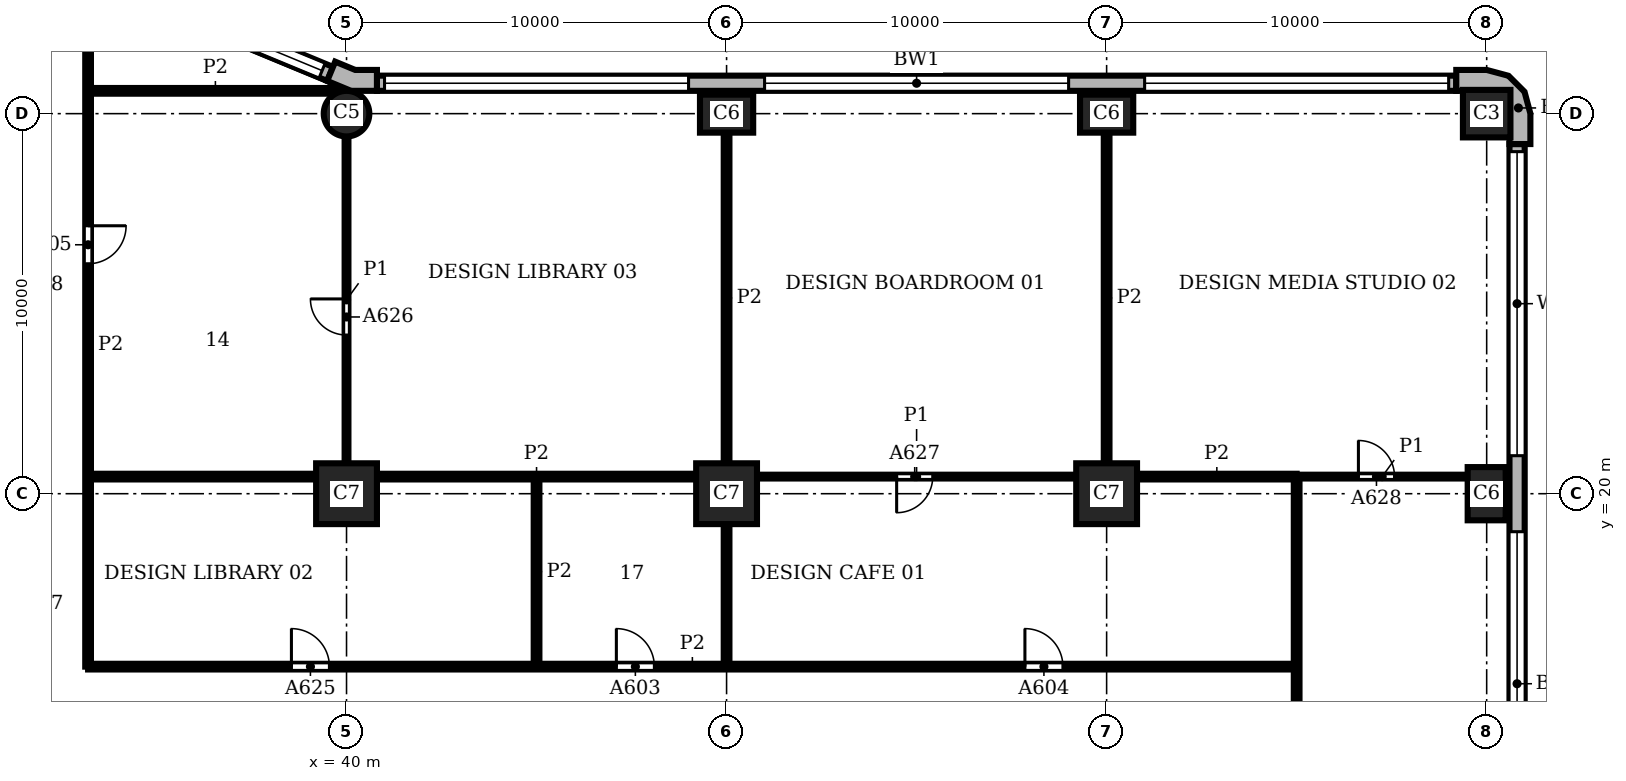
"""IFC4 building model, lengths in metres.
Left out: names, types, materials, properties, quantities, classifications, styles, units other than length and angle.
Written with IfcOpenShell. Run it as: python <this file> out.ifc"""

import sys

from ifc_helpers import new_model, si_unit, direction, frame, frame_2d, origin, origin_2d, place, context, subcontext, project, spatial, polyline, rectangle, circle, outline, extrude, element, fill, save


model = new_model("IFC4")
c1 = context("Model", 3, precision=1e-05, world=origin(), true_north=direction((0.0, 1.0)))
c2 = subcontext(c1, "Body", "Model", "MODEL_VIEW")
j1 = project(units=[si_unit("LENGTHUNIT", "METRE"), si_unit("PLANEANGLEUNIT", "RADIAN")], contexts=[c1])
p1 = place(None, origin())
s1 = spatial("IfcSite", under=j1, at=p1, CompositionType="ELEMENT")
p2 = place(p1, origin())
s2 = spatial("IfcBuilding", under=s1, at=p2, CompositionType="ELEMENT")
p3 = place(p2, frame((0.0, 0.0, 70.5)))
s3 = spatial("IfcBuildingStorey", under=s2, at=p3, CompositionType="ELEMENT", Elevation=70.5)
p4 = place(p3, frame((70.0, 20.0, 0.0), z_axis=(0.0, 0.0, 1.0), x_axis=(0.0, 1.0, 0.0)))
e1 = element("IfcColumn", 1, at=p4, inside=s3, PredefinedType="COLUMN", context=c2, shape_type="SweptSolid", body=[
    extrude(rectangle(XDim=1.4, YDim=1.0, at=origin_2d()), origin(), (0.0, 0.0, 1.0), 3.9),
])
p5 = place(p3, frame((70.0, 30.0, 0.0), z_axis=(0.0, 0.0, 1.0), x_axis=(1.0, 0.0, 0.0)))
e2 = element("IfcColumn", 2, at=p5, inside=s3, PredefinedType="COLUMN", context=c2, shape_type="SweptSolid", body=[
    extrude(rectangle(XDim=1.25, YDim=1.25, at=origin_2d()), origin(), (0.0, 0.0, 1.0), 3.9),
])
for number, where, z_axis, x_axis in (
    (3, (60.0, 30.0, 0.0), (0.0, 0.0, 1.0), (1.0, 0.0, 0.0)),
    (4, (50.0, 30.0, 0.0), (0.0, 0.0, 1.0), (1.0, 0.0, 0.0)),
):
    element("IfcColumn", number, at=place(p3, frame(where, z_axis=z_axis, x_axis=x_axis)), inside=s3, PredefinedType="COLUMN", context=c2, shape_type="SweptSolid", body=[
        extrude(rectangle(XDim=1.4, YDim=1.0, at=origin_2d()), origin(), (0.0, 0.0, 1.0), 3.9),
    ])
p6 = place(p3, frame((40.0, 30.0, 0.0), z_axis=(0.0, 0.0, 1.0), x_axis=(1.0, 0.0, 0.0)))
e5 = element("IfcColumn", 5, at=p6, inside=s3, PredefinedType="COLUMN", context=c2, shape_type="SweptSolid", body=[
    extrude(circle(Radius=0.6, at=origin_2d()), origin(), (0.0, 0.0, 1.0), 3.9),
])
for number, where, z_axis, x_axis in (
    (6, (40.0, 20.0, 0.0), (0.0, 0.0, 1.0), (1.0, 0.0, 0.0)),
    (7, (50.0, 20.0, 0.0), (0.0, 0.0, 1.0), (1.0, 0.0, 0.0)),
    (8, (60.0, 20.0, 0.0), (0.0, 0.0, 1.0), (1.0, 0.0, 0.0)),
):
    element("IfcColumn", number, at=place(p3, frame(where, z_axis=z_axis, x_axis=x_axis)), inside=s3, PredefinedType="COLUMN", context=c2, shape_type="SweptSolid", body=[
        extrude(rectangle(XDim=1.6, YDim=1.6, at=origin_2d()), origin(), (0.0, 0.0, 1.0), 3.9),
    ])
p7 = place(p3, origin())
e9 = element("IfcWall", 9, at=p7, inside=s3, PredefinedType="SOLIDWALL", context=c2, shape_type="SweptSolid", body=[
    extrude(outline(polyline([(71.0, 29.2), (71.15, 29.2), (71.15, 30.0), (70.996, 30.575), (70.575, 30.996), (70.0, 31.15), (69.2, 31.15), (69.2, 31.0), (69.2, 30.6), (70.0, 30.6), (70.3, 30.52), (70.52, 30.3), (70.6, 30.0), (70.6, 29.2), (71.0, 29.2)])), origin(), (0.0, 0.0, 1.0), 3.9),
])
e10 = element("IfcWall", 10, at=p7, inside=s3, PredefinedType="SOLIDWALL", context=c2, shape_type="SweptSolid", body=[
    extrude(outline(polyline([(40.8, 31.0), (40.8, 31.15), (40.229, 31.15), (39.701, 31.369), (39.644, 31.23), (39.49, 30.861), (40.119, 30.6), (40.8, 30.6), (40.8, 31.0)])), origin(), (0.0, 0.0, 1.0), 3.9),
])
p8 = place(p3, frame((70.8, 0.8, 0.0), z_axis=(0.0, 0.0, 1.0), x_axis=(0.0, 1.0, 0.0)))
e11 = element("IfcWall", 11, at=p8, inside=s3, PredefinedType="SOLIDWALL", context=c2, shape_type="SweptSolid", body=[
    extrude(rectangle(XDim=28.4, YDim=0.4, at=frame_2d((14.2, 0.0))), origin(), (0.0, 0.0, 1.0), 3.9),
])
p9 = place(p8, frame((0.2, 0.0, 0.9)))
e12 = element("IfcOpeningElement", 12, at=p9, cuts=e11, PredefinedType="OPENING", context=c2, shape_type="SweptSolid", body=[
    extrude(rectangle(XDim=8.0, YDim=2.35, at=frame_2d((4.0, 1.175))), frame((0.0, 0.21, 0.0), z_axis=(0.0, -1.0, 0.0), x_axis=(1.0, 0.0, 0.0)), (0.0, 0.0, 1.0), 0.42),
])
p10 = place(p8, frame((10.2, 0.0, 0.9)))
e13 = element("IfcOpeningElement", 13, at=p10, cuts=e11, PredefinedType="OPENING", context=c2, shape_type="SweptSolid", body=[
    extrude(rectangle(XDim=8.0, YDim=2.35, at=frame_2d((4.0, 1.175))), frame((0.0, 0.21, 0.0), z_axis=(0.0, -1.0, 0.0), x_axis=(1.0, 0.0, 0.0)), (0.0, 0.0, 1.0), 0.42),
])
p11 = place(p8, frame((20.2, 0.0, 0.9)))
e14 = element("IfcOpeningElement", 14, at=p11, cuts=e11, PredefinedType="OPENING", context=c2, shape_type="SweptSolid", body=[
    extrude(rectangle(XDim=8.0, YDim=2.35, at=frame_2d((4.0, 1.175))), frame((0.0, 0.21, 0.0), z_axis=(0.0, -1.0, 0.0), x_axis=(1.0, 0.0, 0.0)), (0.0, 0.0, 1.0), 0.42),
])
p12 = place(p3, frame((69.2, 30.8, 0.0), z_axis=(0.0, 0.0, 1.0), x_axis=(-1.0, 0.0, 0.0)))
e15 = element("IfcWall", 15, at=p12, inside=s3, PredefinedType="SOLIDWALL", context=c2, shape_type="SweptSolid", body=[
    extrude(rectangle(XDim=28.4, YDim=0.4, at=frame_2d((14.2, 0.0))), origin(), (0.0, 0.0, 1.0), 3.9),
])
p13 = place(p12, frame((0.2, 0.0, 0.9)))
e16 = element("IfcOpeningElement", 16, at=p13, cuts=e15, PredefinedType="OPENING", context=c2, shape_type="SweptSolid", body=[
    extrude(rectangle(XDim=8.0, YDim=2.35, at=frame_2d((4.0, 1.175))), frame((0.0, 0.21, 0.0), z_axis=(0.0, -1.0, 0.0), x_axis=(1.0, 0.0, 0.0)), (0.0, 0.0, 1.0), 0.42),
])
p14 = place(p12, frame((10.2, 0.0, 0.9)))
e17 = element("IfcOpeningElement", 17, at=p14, cuts=e15, PredefinedType="OPENING", context=c2, shape_type="SweptSolid", body=[
    extrude(rectangle(XDim=8.0, YDim=2.35, at=frame_2d((4.0, 1.175))), frame((0.0, 0.21, 0.0), z_axis=(0.0, -1.0, 0.0), x_axis=(1.0, 0.0, 0.0)), (0.0, 0.0, 1.0), 0.42),
])
p15 = place(p12, frame((20.2, 0.0, 0.9)))
e18 = element("IfcOpeningElement", 18, at=p15, cuts=e15, PredefinedType="OPENING", context=c2, shape_type="SweptSolid", body=[
    extrude(rectangle(XDim=8.0, YDim=2.35, at=frame_2d((4.0, 1.175))), frame((0.0, 0.21, 0.0), z_axis=(0.0, -1.0, 0.0), x_axis=(1.0, 0.0, 0.0)), (0.0, 0.0, 1.0), 0.42),
])
p16 = place(p3, frame((39.567, 31.045, 0.0), z_axis=(0.0, 0.0, 1.0), x_axis=(-0.923891000409, 0.382655745237, 0.0)))
e19 = element("IfcWall", 19, at=p16, inside=s3, PredefinedType="SOLIDWALL", context=c2, shape_type="SweptSolid", body=[
    extrude(rectangle(XDim=6.053, YDim=0.4, at=frame_2d((3.027, 0.0))), origin(), (0.0, 0.0, 1.0), 3.9),
])
p17 = place(p16, frame((0.227, 0.0, 0.9)))
e20 = element("IfcOpeningElement", 20, at=p17, cuts=e19, PredefinedType="OPENING", context=c2, shape_type="SweptSolid", body=[
    extrude(rectangle(XDim=5.6, YDim=2.35, at=frame_2d((2.8, 1.175))), frame((0.0, 0.21, 0.0), z_axis=(0.0, -1.0, 0.0), x_axis=(1.0, 0.0, 0.0)), (0.0, 0.0, 1.0), 0.42),
])
p18 = place(p3, frame((40.0, 20.8, 0.0), z_axis=(0.0, 0.0, 1.0), x_axis=(0.0, 1.0, 0.0)))
e21 = element("IfcWall", 21, at=p18, inside=s3, PredefinedType="PARTITIONING", context=c2, shape_type="SweptSolid", body=[
    extrude(rectangle(XDim=8.6, YDim=0.1, at=frame_2d((4.3, 0.0))), origin(), (0.0, 0.0, 1.0), 3.58),
])
p19 = place(p18, frame((3.375, 0.0, 0.0)))
e22 = element("IfcOpeningElement", 22, at=p19, cuts=e21, PredefinedType="OPENING", context=c2, shape_type="SweptSolid", body=[
    extrude(rectangle(XDim=0.95, YDim=2.1, at=frame_2d((0.475, 1.05))), frame((0.0, 0.06, 0.0), z_axis=(0.0, -1.0, 0.0), x_axis=(1.0, 0.0, 0.0)), (0.0, 0.0, 1.0), 0.12),
])
p20 = place(p3, frame((50.8, 20.45, 0.0), z_axis=(0.0, 0.0, 1.0), x_axis=(1.0, 0.0, 0.0)))
e23 = element("IfcWall", 23, at=p20, inside=s3, PredefinedType="PARTITIONING", context=c2, shape_type="SweptSolid", body=[
    extrude(rectangle(XDim=8.4, YDim=0.1, at=frame_2d((4.2, 0.0))), origin(), (0.0, 0.0, 1.0), 3.58),
])
p21 = place(p20, frame((3.675, 0.0, 0.0)))
e24 = element("IfcOpeningElement", 24, at=p21, cuts=e23, PredefinedType="OPENING", context=c2, shape_type="SweptSolid", body=[
    extrude(rectangle(XDim=0.95, YDim=2.1, at=frame_2d((0.475, 1.05))), frame((0.0, 0.06, 0.0), z_axis=(0.0, -1.0, 0.0), x_axis=(1.0, 0.0, 0.0)), (0.0, 0.0, 1.0), 0.12),
])
p22 = place(p3, frame((65.0, 20.45, 0.0), z_axis=(0.0, 0.0, 1.0), x_axis=(1.0, 0.0, 0.0)))
e25 = element("IfcWall", 25, at=p22, inside=s3, PredefinedType="PARTITIONING", context=c2, shape_type="SweptSolid", body=[
    extrude(rectangle(XDim=4.5, YDim=0.1, at=frame_2d((2.25, 0.0))), origin(), (0.0, 0.0, 1.0), 3.58),
])
p23 = place(p22, frame((1.625, 0.0, 0.0)))
e26 = element("IfcOpeningElement", 26, at=p23, cuts=e25, PredefinedType="OPENING", context=c2, shape_type="SweptSolid", body=[
    extrude(rectangle(XDim=0.95, YDim=2.1, at=frame_2d((0.475, 1.05))), frame((0.0, 0.06, 0.0), z_axis=(0.0, -1.0, 0.0), x_axis=(1.0, 0.0, 0.0)), (0.0, 0.0, 1.0), 0.12),
])
p24 = place(p3, frame((33.2, 15.45, 0.0), z_axis=(0.0, 0.0, 1.0), x_axis=(0.0, 1.0, 0.0)))
e27 = element("IfcWall", 27, at=p24, inside=s3, PredefinedType="PARTITIONING", context=c2, shape_type="SweptSolid", body=[
    extrude(rectangle(XDim=16.912, YDim=0.15, at=frame_2d((8.456, 0.0))), origin(), (0.0, 0.0, 1.0), 3.58),
])
p25 = place(p24, frame((10.6, 0.0, 0.0)))
e28 = element("IfcOpeningElement", 28, at=p25, cuts=e27, PredefinedType="OPENING", context=c2, shape_type="SweptSolid", body=[
    extrude(rectangle(XDim=1.0, YDim=2.1, at=frame_2d((0.5, 1.05))), frame((0.0, 0.085, 0.0), z_axis=(0.0, -1.0, 0.0), x_axis=(1.0, 0.0, 0.0)), (0.0, 0.0, 1.0), 0.17),
])
p26 = place(p3, frame((45.0, 15.45, 0.0), z_axis=(0.0, 0.0, 1.0), x_axis=(0.0, 1.0, 0.0)))
e29 = element("IfcWall", 29, at=p26, inside=s3, PredefinedType="PARTITIONING", context=c2, shape_type="SweptSolid", body=[
    extrude(rectangle(XDim=5.0, YDim=0.15, at=frame_2d((2.5, 0.0))), origin(), (0.0, 0.0, 1.0), 3.58),
])
p27 = place(p3, frame((50.0, 15.45, 0.0), z_axis=(0.0, 0.0, 1.0), x_axis=(0.0, 1.0, 0.0)))
e30 = element("IfcWall", 30, at=p27, inside=s3, PredefinedType="PARTITIONING", context=c2, shape_type="SweptSolid", body=[
    extrude(rectangle(XDim=3.75, YDim=0.15, at=frame_2d((1.875, 0.0))), origin(), (0.0, 0.0, 1.0), 3.58),
])
for number, where, z_axis, x_axis in (
    (31, (50.0, 20.8, 0.0), (0.0, 0.0, 1.0), (0.0, 1.0, 0.0)),
    (32, (60.0, 20.8, 0.0), (0.0, 0.0, 1.0), (0.0, 1.0, 0.0)),
):
    element("IfcWall", number, at=place(p3, frame(where, z_axis=z_axis, x_axis=x_axis)), inside=s3, PredefinedType="PARTITIONING", context=c2, shape_type="SweptSolid", body=[
        extrude(rectangle(XDim=8.7, YDim=0.15, at=frame_2d((4.35, 0.0))), origin(), (0.0, 0.0, 1.0), 3.58),
    ])
p28 = place(p3, frame((65.0, 5.6, 0.0), z_axis=(0.0, 0.0, 1.0), x_axis=(0.0, 1.0, 0.0)))
e33 = element("IfcWall", 33, at=p28, inside=s3, PredefinedType="PARTITIONING", context=c2, shape_type="SweptSolid", body=[
    extrude(rectangle(XDim=14.85, YDim=0.15, at=frame_2d((7.425, 0.0))), origin(), (0.0, 0.0, 1.0), 3.58),
])
p29 = place(p3, frame((33.2, 15.45, 0.0), z_axis=(0.0, 0.0, 1.0), x_axis=(1.0, 0.0, 0.0)))
e34 = element("IfcWall", 34, at=p29, inside=s3, PredefinedType="PARTITIONING", context=c2, shape_type="SweptSolid", body=[
    extrude(rectangle(XDim=31.8, YDim=0.15, at=frame_2d((15.9, 0.0))), origin(), (0.0, 0.0, 1.0), 3.58),
])
p30 = place(p29, frame((13.9, 0.0, 0.0)))
e35 = element("IfcOpeningElement", 35, at=p30, cuts=e34, PredefinedType="OPENING", context=c2, shape_type="SweptSolid", body=[
    extrude(rectangle(XDim=1.0, YDim=2.1, at=frame_2d((0.5, 1.05))), frame((0.0, 0.085, 0.0), z_axis=(0.0, -1.0, 0.0), x_axis=(1.0, 0.0, 0.0)), (0.0, 0.0, 1.0), 0.17),
])
p31 = place(p29, frame((24.65, 0.0, 0.0)))
e36 = element("IfcOpeningElement", 36, at=p31, cuts=e34, PredefinedType="OPENING", context=c2, shape_type="SweptSolid", body=[
    extrude(rectangle(XDim=1.0, YDim=2.1, at=frame_2d((0.5, 1.05))), frame((0.0, 0.085, 0.0), z_axis=(0.0, -1.0, 0.0), x_axis=(1.0, 0.0, 0.0)), (0.0, 0.0, 1.0), 0.17),
])
p32 = place(p29, frame((5.35, 0.0, 0.0)))
e37 = element("IfcOpeningElement", 37, at=p32, cuts=e34, PredefinedType="OPENING", context=c2, shape_type="SweptSolid", body=[
    extrude(rectangle(XDim=1.0, YDim=2.1, at=frame_2d((0.5, 1.05))), frame((0.0, 0.085, 0.0), z_axis=(0.0, -1.0, 0.0), x_axis=(1.0, 0.0, 0.0)), (0.0, 0.0, 1.0), 0.17),
])
p33 = place(p3, frame((33.2, 20.45, 0.0), z_axis=(0.0, 0.0, 1.0), x_axis=(1.0, 0.0, 0.0)))
e38 = element("IfcWall", 38, at=p33, inside=s3, PredefinedType="PARTITIONING", context=c2, shape_type="SweptSolid", body=[
    extrude(rectangle(XDim=6.0, YDim=0.15, at=frame_2d((3.0, 0.0))), origin(), (0.0, 0.0, 1.0), 3.58),
])
p34 = place(p3, frame((40.8, 20.45, 0.0), z_axis=(0.0, 0.0, 1.0), x_axis=(1.0, 0.0, 0.0)))
e39 = element("IfcWall", 39, at=p34, inside=s3, PredefinedType="PARTITIONING", context=c2, shape_type="SweptSolid", body=[
    extrude(rectangle(XDim=8.4, YDim=0.15, at=frame_2d((4.2, 0.0))), origin(), (0.0, 0.0, 1.0), 3.58),
])
p35 = place(p3, frame((60.8, 20.45, 0.0), z_axis=(0.0, 0.0, 1.0), x_axis=(1.0, 0.0, 0.0)))
e40 = element("IfcWall", 40, at=p35, inside=s3, PredefinedType="PARTITIONING", context=c2, shape_type="SweptSolid", body=[
    extrude(rectangle(XDim=4.2, YDim=0.15, at=frame_2d((2.1, 0.0))), origin(), (0.0, 0.0, 1.0), 3.58),
])
p36 = place(p3, frame((33.2, 30.6, 0.0), z_axis=(0.0, 0.0, 1.0), x_axis=(1.0, 0.0, 0.0)))
e41 = element("IfcWall", 41, at=p36, inside=s3, PredefinedType="PARTITIONING", context=c2, shape_type="SweptSolid", body=[
    extrude(rectangle(XDim=6.699, YDim=0.15, at=frame_2d((3.35, 0.0))), origin(), (0.0, 0.0, 1.0), 3.58),
])
p37 = place(p10, origin())
e42 = element("IfcWindow", 42, at=p37, inside=s3, PartitioningType="SINGLE_PANEL", PredefinedType="WINDOW", context=c2, shape_type="SweptSolid", body=[
    extrude(rectangle(XDim=8.0, YDim=2.35, at=frame_2d((4.0, 1.175))), frame((0.0, 0.16, 0.0), z_axis=(0.0, -1.0, 0.0), x_axis=(1.0, 0.0, 0.0)), (0.0, 0.0, 1.0), 0.06),
])
fill(e13, e42)
p38 = place(p11, origin())
e43 = element("IfcWindow", 43, at=p38, inside=s3, PartitioningType="SINGLE_PANEL", PredefinedType="WINDOW", context=c2, shape_type="SweptSolid", body=[
    extrude(rectangle(XDim=8.0, YDim=2.35, at=frame_2d((4.0, 1.175))), frame((0.0, 0.16, 0.0), z_axis=(0.0, -1.0, 0.0), x_axis=(1.0, 0.0, 0.0)), (0.0, 0.0, 1.0), 0.06),
])
fill(e14, e43)
p39 = place(p13, origin())
e44 = element("IfcWindow", 44, at=p39, inside=s3, PartitioningType="SINGLE_PANEL", PredefinedType="WINDOW", context=c2, shape_type="SweptSolid", body=[
    extrude(rectangle(XDim=8.0, YDim=2.35, at=frame_2d((4.0, 1.175))), frame((0.0, 0.16, 0.0), z_axis=(0.0, -1.0, 0.0), x_axis=(1.0, 0.0, 0.0)), (0.0, 0.0, 1.0), 0.06),
])
fill(e16, e44)
p40 = place(p14, origin())
e45 = element("IfcWindow", 45, at=p40, inside=s3, PartitioningType="SINGLE_PANEL", PredefinedType="WINDOW", context=c2, shape_type="SweptSolid", body=[
    extrude(rectangle(XDim=8.0, YDim=2.35, at=frame_2d((4.0, 1.175))), frame((0.0, 0.16, 0.0), z_axis=(0.0, -1.0, 0.0), x_axis=(1.0, 0.0, 0.0)), (0.0, 0.0, 1.0), 0.06),
])
fill(e17, e45)
p41 = place(p15, origin())
e46 = element("IfcWindow", 46, at=p41, inside=s3, PartitioningType="SINGLE_PANEL", PredefinedType="WINDOW", context=c2, shape_type="SweptSolid", body=[
    extrude(rectangle(XDim=8.0, YDim=2.35, at=frame_2d((4.0, 1.175))), frame((0.0, 0.16, 0.0), z_axis=(0.0, -1.0, 0.0), x_axis=(1.0, 0.0, 0.0)), (0.0, 0.0, 1.0), 0.06),
])
fill(e18, e46)
p42 = place(p17, origin())
e47 = element("IfcWindow", 47, at=p42, inside=s3, PartitioningType="SINGLE_PANEL", PredefinedType="WINDOW", context=c2, shape_type="SweptSolid", body=[
    extrude(rectangle(XDim=5.6, YDim=2.35, at=frame_2d((2.8, 1.175))), frame((0.0, 0.16, 0.0), z_axis=(0.0, -1.0, 0.0), x_axis=(1.0, 0.0, 0.0)), (0.0, 0.0, 1.0), 0.06),
])
fill(e20, e47)
p43 = place(p30, origin())
e48 = element("IfcDoor", 48, at=p43, inside=s3, OperationType="SINGLE_SWING_LEFT", PredefinedType="DOOR", context=c2, shape_type="SweptSolid", body=[
    extrude(rectangle(XDim=1.0, YDim=2.1, at=frame_2d((0.5, 1.05))), frame((0.0, 0.025, 0.0), z_axis=(0.0, -1.0, 0.0), x_axis=(1.0, 0.0, 0.0)), (0.0, 0.0, 1.0), 0.05),
])
fill(e35, e48)
p44 = place(p31, origin())
e49 = element("IfcDoor", 49, at=p44, inside=s3, OperationType="SINGLE_SWING_LEFT", PredefinedType="DOOR", context=c2, shape_type="SweptSolid", body=[
    extrude(rectangle(XDim=1.0, YDim=2.1, at=frame_2d((0.5, 1.05))), frame((0.0, 0.025, 0.0), z_axis=(0.0, -1.0, 0.0), x_axis=(1.0, 0.0, 0.0)), (0.0, 0.0, 1.0), 0.05),
])
fill(e36, e49)
p45 = place(p25, frame((1.0, 0.0, 0.0), z_axis=(0.0, 0.0, 1.0), x_axis=(-1.0, 0.0, 0.0)))
e50 = element("IfcDoor", 50, at=p45, inside=s3, OperationType="SINGLE_SWING_LEFT", PredefinedType="DOOR", context=c2, shape_type="SweptSolid", body=[
    extrude(rectangle(XDim=1.0, YDim=2.1, at=frame_2d((0.5, 1.05))), frame((0.0, 0.025, 0.0), z_axis=(0.0, -1.0, 0.0), x_axis=(1.0, 0.0, 0.0)), (0.0, 0.0, 1.0), 0.05),
])
fill(e28, e50)
p46 = place(p32, origin())
e51 = element("IfcDoor", 51, at=p46, inside=s3, OperationType="SINGLE_SWING_LEFT", PredefinedType="DOOR", context=c2, shape_type="SweptSolid", body=[
    extrude(rectangle(XDim=1.0, YDim=2.1, at=frame_2d((0.5, 1.05))), frame((0.0, 0.025, 0.0), z_axis=(0.0, -1.0, 0.0), x_axis=(1.0, 0.0, 0.0)), (0.0, 0.0, 1.0), 0.05),
])
fill(e37, e51)
p47 = place(p19, origin())
e52 = element("IfcDoor", 52, at=p47, inside=s3, OperationType="SINGLE_SWING_RIGHT", PredefinedType="DOOR", context=c2, shape_type="SweptSolid", body=[
    extrude(rectangle(XDim=0.95, YDim=2.1, at=frame_2d((0.475, 1.05))), frame((0.0, 0.025, 0.0), z_axis=(0.0, -1.0, 0.0), x_axis=(1.0, 0.0, 0.0)), (0.0, 0.0, 1.0), 0.05),
])
fill(e22, e52)
p48 = place(p21, frame((0.95, 0.0, 0.0), z_axis=(0.0, 0.0, 1.0), x_axis=(-1.0, 0.0, 0.0)))
e53 = element("IfcDoor", 53, at=p48, inside=s3, OperationType="SINGLE_SWING_RIGHT", PredefinedType="DOOR", context=c2, shape_type="SweptSolid", body=[
    extrude(rectangle(XDim=0.95, YDim=2.1, at=frame_2d((0.475, 1.05))), frame((0.0, 0.025, 0.0), z_axis=(0.0, -1.0, 0.0), x_axis=(1.0, 0.0, 0.0)), (0.0, 0.0, 1.0), 0.05),
])
fill(e24, e53)
p49 = place(p23, origin())
e54 = element("IfcDoor", 54, at=p49, inside=s3, OperationType="SINGLE_SWING_LEFT", PredefinedType="DOOR", context=c2, shape_type="SweptSolid", body=[
    extrude(rectangle(XDim=0.95, YDim=2.1, at=frame_2d((0.475, 1.05))), frame((0.0, 0.025, 0.0), z_axis=(0.0, -1.0, 0.0), x_axis=(1.0, 0.0, 0.0)), (0.0, 0.0, 1.0), 0.05),
])
fill(e26, e54)
save(model, sys.argv[1])
